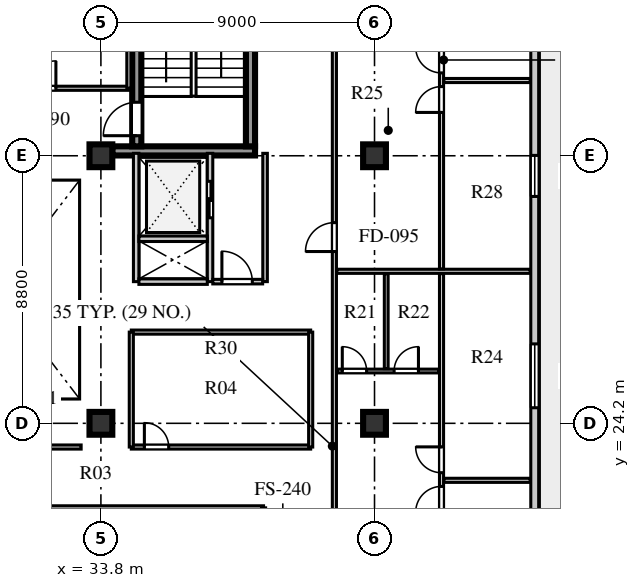
"""IFC4 building model, lengths in metres.
Left out: names, types, materials, properties, quantities, classifications, styles, units other than length and angle.
Written with IfcOpenShell. Run it as: python <this file> out.ifc"""

import sys

from ifc_helpers import new_model, si_unit, direction, frame, frame_2d, origin, origin_2d, place, context, subcontext, project, spatial, rectangle, extrude, element, fill, save


model = new_model("IFC4")
c1 = context("Model", 3, precision=1e-05, world=origin(), true_north=direction((0.0, 1.0)))
c2 = subcontext(c1, "Body", "Model", "MODEL_VIEW")
j1 = project(units=[si_unit("LENGTHUNIT", "METRE"), si_unit("PLANEANGLEUNIT", "RADIAN")], contexts=[c1])
p1 = place(None, origin())
s1 = spatial("IfcSite", under=j1, at=p1, CompositionType="ELEMENT")
p2 = place(p1, origin())
s2 = spatial("IfcBuilding", under=s1, at=p2, CompositionType="ELEMENT")
p3 = place(p2, frame((0.0, 0.0, 296.0)))
s3 = spatial("IfcBuildingStorey", under=s2, at=p3, CompositionType="ELEMENT", Elevation=296.0)
p4 = place(p3, frame((34.175, 33.16, 0.0), z_axis=(0.0, 0.0, 1.0), x_axis=(1.0, 0.0, 0.0)))
e1 = element("IfcWall", 1, at=p4, inside=s3, PredefinedType="SHEAR", context=c2, shape_type="SweptSolid", body=[
    extrude(rectangle(XDim=4.695, YDim=0.3, at=frame_2d((2.348, 0.0))), origin(), (0.0, 0.0, 1.0), 3.66),
])
p5 = place(p3, frame((34.98, 33.31, 0.0), z_axis=(0.0, 0.0, 1.0), x_axis=(0.0, 1.0, 0.0)))
e2 = element("IfcWall", 2, at=p5, inside=s3, PredefinedType="SHEAR", context=c2, shape_type="SweptSolid", body=[
    extrude(rectangle(XDim=8.03, YDim=0.3, at=frame_2d((4.015, 0.0))), origin(), (0.0, 0.0, 1.0), 3.66),
])
p6 = place(p5, frame((0.35, 0.0, 0.0)))
e3 = element("IfcOpeningElement", 3, at=p6, cuts=e2, PredefinedType="OPENING", context=c2, shape_type="SweptSolid", body=[
    extrude(rectangle(XDim=1.1, YDim=2.1, at=frame_2d((0.55, 1.05))), frame((0.0, 0.16, 0.0), z_axis=(0.0, -1.0, 0.0), x_axis=(1.0, 0.0, 0.0)), (0.0, 0.0, 1.0), 0.32),
])
p7 = place(p3, frame((38.72, 33.31, 0.0), z_axis=(0.0, 0.0, 1.0), x_axis=(0.0, 1.0, 0.0)))
e4 = element("IfcWall", 4, at=p7, inside=s3, PredefinedType="SHEAR", context=c2, shape_type="SweptSolid", body=[
    extrude(rectangle(XDim=8.03, YDim=0.3, at=frame_2d((4.015, 0.0))), origin(), (0.0, 0.0, 1.0), 3.66),
])
for number, where, z_axis, x_axis in (
    (5, (33.8, 24.2, 0.0), (0.0, 0.0, 1.0), (1.0, 0.0, 0.0)),
    (6, (33.8, 33.0, 0.0), (0.0, 0.0, 1.0), (1.0, 0.0, 0.0)),
    (7, (42.8, 24.2, 0.0), (0.0, 0.0, 1.0), (1.0, 0.0, 0.0)),
    (8, (42.8, 33.0, 0.0), (0.0, 0.0, 1.0), (1.0, 0.0, 0.0)),
):
    element("IfcColumn", number, at=place(p3, frame(where, z_axis=z_axis, x_axis=x_axis)), inside=s3, PredefinedType="COLUMN", context=c2, shape_type="SweptSolid", body=[
        extrude(rectangle(XDim=0.75, YDim=0.75, at=origin_2d()), origin(), (0.0, 0.0, 1.0), 3.66),
    ])
p8 = place(p3, frame((48.07, 13.41, 0.0), z_axis=(0.0, 0.0, 1.0), x_axis=(0.0, 1.0, 0.0)))
e9 = element("IfcWall", 9, at=p8, inside=s3, PredefinedType="SOLIDWALL", context=c2, shape_type="SweptSolid", body=[
    extrude(rectangle(XDim=30.38, YDim=0.26, at=frame_2d((15.19, 0.0))), origin(), (0.0, 0.0, 1.0), 3.66),
])
p9 = place(p8, frame((2.43, 0.0, 0.0)))
e10 = element("IfcOpeningElement", 10, at=p9, cuts=e9, PredefinedType="OPENING", context=c2, shape_type="SweptSolid", body=[
    extrude(rectangle(XDim=1.0, YDim=2.05, at=frame_2d((0.5, 1.025))), frame((0.0, 0.14, 0.0), z_axis=(0.0, -1.0, 0.0), x_axis=(1.0, 0.0, 0.0)), (0.0, 0.0, 1.0), 0.28),
])
p10 = place(p8, frame((5.002, 0.0, 0.8)))
e11 = element("IfcOpeningElement", 11, at=p10, cuts=e9, PredefinedType="OPENING", context=c2, shape_type="SweptSolid", body=[
    extrude(rectangle(XDim=2.4, YDim=2.05, at=frame_2d((1.2, 1.025))), frame((0.0, 0.14, 0.0), z_axis=(0.0, -1.0, 0.0), x_axis=(1.0, 0.0, 0.0)), (0.0, 0.0, 1.0), 0.28),
])
p11 = place(p8, frame((11.302, 0.0, 0.8)))
e12 = element("IfcOpeningElement", 12, at=p11, cuts=e9, PredefinedType="OPENING", context=c2, shape_type="SweptSolid", body=[
    extrude(rectangle(XDim=2.1, YDim=1.95, at=frame_2d((1.05, 0.975))), frame((0.0, 0.14, 0.0), z_axis=(0.0, -1.0, 0.0), x_axis=(1.0, 0.0, 0.0)), (0.0, 0.0, 1.0), 0.28),
])
p12 = place(p8, frame((18.252, 0.0, 0.8)))
e13 = element("IfcOpeningElement", 13, at=p12, cuts=e9, PredefinedType="OPENING", context=c2, shape_type="SweptSolid", body=[
    extrude(rectangle(XDim=1.35, YDim=1.9, at=frame_2d((0.675, 0.95))), frame((0.0, 0.14, 0.0), z_axis=(0.0, -1.0, 0.0), x_axis=(1.0, 0.0, 0.0)), (0.0, 0.0, 1.0), 0.28),
])
p13 = place(p8, frame((24.427, 0.0, 0.8)))
e14 = element("IfcOpeningElement", 14, at=p13, cuts=e9, PredefinedType="OPENING", context=c2, shape_type="SweptSolid", body=[
    extrude(rectangle(XDim=1.65, YDim=1.95, at=frame_2d((0.825, 0.975))), frame((0.0, 0.14, 0.0), z_axis=(0.0, -1.0, 0.0), x_axis=(1.0, 0.0, 0.0)), (0.0, 0.0, 1.0), 0.28),
])
p14 = place(p3, frame((34.96, 28.86, 0.0), z_axis=(0.0, 0.0, 1.0), x_axis=(0.0, 1.0, 0.0)))
e15 = element("IfcWall", 15, at=p14, inside=s3, PredefinedType="SOLIDWALL", context=c2, shape_type="SweptSolid", body=[
    extrude(rectangle(XDim=4.22, YDim=0.18, at=frame_2d((2.11, 0.0))), origin(), (0.0, 0.0, 1.0), 3.66),
])
p15 = place(p3, frame((37.39, 28.86, 0.0), z_axis=(0.0, 0.0, 1.0), x_axis=(0.0, 1.0, 0.0)))
e16 = element("IfcWall", 16, at=p15, inside=s3, PredefinedType="SOLIDWALL", context=c2, shape_type="SweptSolid", body=[
    extrude(rectangle(XDim=4.22, YDim=0.18, at=frame_2d((2.11, 0.0))), origin(), (0.0, 0.0, 1.0), 3.66),
])
p16 = place(p15, frame((2.1, 0.0, 0.0)))
e17 = element("IfcOpeningElement", 17, at=p16, cuts=e16, PredefinedType="OPENING", context=c2, shape_type="SweptSolid", body=[
    extrude(rectangle(XDim=1.2, YDim=2.12, at=frame_2d((0.6, 1.06))), frame((0.0, 0.1, 0.0), z_axis=(0.0, -1.0, 0.0), x_axis=(1.0, 0.0, 0.0)), (0.0, 0.0, 1.0), 0.2),
])
for number, where, z_axis, x_axis in (
    (18, (35.05, 28.86, 0.0), (0.0, 0.0, 1.0), (1.0, 0.0, 0.0)),
    (19, (35.05, 30.27, 0.0), (0.0, 0.0, 1.0), (1.0, 0.0, 0.0)),
):
    element("IfcWall", number, at=place(p3, frame(where, z_axis=z_axis, x_axis=x_axis)), inside=s3, PredefinedType="SOLIDWALL", context=c2, shape_type="SweptSolid", body=[
        extrude(rectangle(XDim=2.25, YDim=0.18, at=frame_2d((1.125, 0.0))), origin(), (0.0, 0.0, 1.0), 3.66),
    ])
p17 = place(p3, frame((39.2, 28.86, 0.0), z_axis=(0.0, 0.0, 1.0), x_axis=(0.0, 1.0, 0.0)))
e20 = element("IfcWall", 20, at=p17, inside=s3, PredefinedType="PARTITIONING", context=c2, shape_type="SweptSolid", body=[
    extrude(rectangle(XDim=4.22, YDim=0.15, at=frame_2d((2.11, 0.0))), origin(), (0.0, 0.0, 1.0), 3.66),
])
p18 = place(p3, frame((37.48, 28.86, 0.0), z_axis=(0.0, 0.0, 1.0), x_axis=(1.0, 0.0, 0.0)))
e21 = element("IfcWall", 21, at=p18, inside=s3, PredefinedType="PARTITIONING", context=c2, shape_type="SweptSolid", body=[
    extrude(rectangle(XDim=1.64, YDim=0.15, at=frame_2d((0.82, 0.0))), origin(), (0.0, 0.0, 1.0), 3.66),
])
p19 = place(p18, frame((0.3, 0.0, 0.0)))
e22 = element("IfcOpeningElement", 22, at=p19, cuts=e21, PredefinedType="OPENING", context=c2, shape_type="SweptSolid", body=[
    extrude(rectangle(XDim=1.0, YDim=2.1, at=frame_2d((0.5, 1.05))), frame((0.0, 0.085, 0.0), z_axis=(0.0, -1.0, 0.0), x_axis=(1.0, 0.0, 0.0)), (0.0, 0.0, 1.0), 0.17),
])
p20 = place(p3, frame((27.08, 21.42, 0.0), z_axis=(0.0, 0.0, 1.0), x_axis=(1.0, 0.0, 0.0)))
e23 = element("IfcWall", 23, at=p20, inside=s3, PredefinedType="PARTITIONING", context=c2, shape_type="SweptSolid", body=[
    extrude(rectangle(XDim=12.07, YDim=0.135, at=frame_2d((6.035, 0.0))), origin(), (0.0, 0.0, 1.0), 3.36),
])
p21 = place(p20, frame((0.63, 0.0, 0.0)))
e24 = element("IfcOpeningElement", 24, at=p21, cuts=e23, PredefinedType="OPENING", context=c2, shape_type="SweptSolid", body=[
    extrude(rectangle(XDim=0.95, YDim=2.1, at=frame_2d((0.475, 1.05))), frame((0.0, 0.078, 0.0), z_axis=(0.0, -1.0, 0.0), x_axis=(1.0, 0.0, 0.0)), (0.0, 0.0, 1.0), 0.155),
])
p22 = place(p3, frame((27.15, 23.42, 0.0), z_axis=(0.0, 0.0, 1.0), x_axis=(1.0, 0.0, 0.0)))
e25 = element("IfcWall", 25, at=p22, inside=s3, PredefinedType="PARTITIONING", context=c2, shape_type="SweptSolid", body=[
    extrude(rectangle(XDim=6.0, YDim=0.135, at=frame_2d((3.0, 0.0))), origin(), (0.0, 0.0, 1.0), 3.66),
])
p23 = place(p3, frame((25.22, 35.22, 0.0), z_axis=(0.0, 0.0, 1.0), x_axis=(1.0, 0.0, 0.0)))
e26 = element("IfcWall", 26, at=p23, inside=s3, PredefinedType="PARTITIONING", context=c2, shape_type="SweptSolid", body=[
    extrude(rectangle(XDim=9.5, YDim=0.135, at=frame_2d((4.75, 0.0))), origin(), (0.0, 0.0, 1.0), 3.66),
])
p24 = place(p23, frame((1.2, 0.0, 0.0)))
e27 = element("IfcOpeningElement", 27, at=p24, cuts=e26, PredefinedType="OPENING", context=c2, shape_type="SweptSolid", body=[
    extrude(rectangle(XDim=1.0, YDim=2.08, at=frame_2d((0.5, 1.04))), frame((0.0, 0.078, 0.0), z_axis=(0.0, -1.0, 0.0), x_axis=(1.0, 0.0, 0.0)), (0.0, 0.0, 1.0), 0.155),
])
p25 = place(p23, frame((6.2, 0.0, 0.0)))
e28 = element("IfcOpeningElement", 28, at=p25, cuts=e26, PredefinedType="OPENING", context=c2, shape_type="SweptSolid", body=[
    extrude(rectangle(XDim=0.9, YDim=2.08, at=frame_2d((0.45, 1.04))), frame((0.0, 0.078, 0.0), z_axis=(0.0, -1.0, 0.0), x_axis=(1.0, 0.0, 0.0)), (0.0, 0.0, 1.0), 0.155),
])
p26 = place(p3, frame((39.15, 10.38, 0.0), z_axis=(0.0, 0.0, 1.0), x_axis=(0.0, 1.0, 0.0)))
e29 = element("IfcWall", 29, at=p26, inside=s3, PredefinedType="PARTITIONING", context=c2, shape_type="SweptSolid", body=[
    extrude(rectangle(XDim=11.04, YDim=0.135, at=frame_2d((5.52, 0.0))), origin(), (0.0, 0.0, 1.0), 3.66),
])
p27 = place(p3, frame((34.72, 35.22, 0.0), z_axis=(0.0, 0.0, 1.0), x_axis=(0.0, 1.0, 0.0)))
e30 = element("IfcWall", 30, at=p27, inside=s3, PredefinedType="PARTITIONING", context=c2, shape_type="SweptSolid", body=[
    extrude(rectangle(XDim=11.6, YDim=0.135, at=frame_2d((5.8, 0.0))), origin(), (0.0, 0.0, 1.0), 3.66),
])
p28 = place(p3, frame((41.48, 15.35, 0.0), z_axis=(0.0, 0.0, 1.0), x_axis=(0.0, 1.0, 0.0)))
e31 = element("IfcWall", 31, at=p28, inside=s3, PredefinedType="PARTITIONING", context=c2, shape_type="SweptSolid", body=[
    extrude(rectangle(XDim=26.5, YDim=0.135, at=frame_2d((13.25, 0.0))), origin(), (0.0, 0.0, 1.0), 3.66),
])
p29 = place(p28, frame((0.75, 0.0, 0.0)))
e32 = element("IfcOpeningElement", 32, at=p29, cuts=e31, PredefinedType="OPENING", context=c2, shape_type="SweptSolid", body=[
    extrude(rectangle(XDim=0.95, YDim=2.1, at=frame_2d((0.475, 1.05))), frame((0.0, 0.078, 0.0), z_axis=(0.0, -1.0, 0.0), x_axis=(1.0, 0.0, 0.0)), (0.0, 0.0, 1.0), 0.155),
])
p30 = place(p28, frame((14.5, 0.0, 0.0)))
e33 = element("IfcOpeningElement", 33, at=p30, cuts=e31, PredefinedType="OPENING", context=c2, shape_type="SweptSolid", body=[
    extrude(rectangle(XDim=0.95, YDim=2.1, at=frame_2d((0.475, 1.05))), frame((0.0, 0.078, 0.0), z_axis=(0.0, -1.0, 0.0), x_axis=(1.0, 0.0, 0.0)), (0.0, 0.0, 1.0), 0.155),
])
p31 = place(p3, frame((45.004, 15.53, 0.0), z_axis=(0.0, 0.0, 1.0), x_axis=(0.0, 1.0, 0.0)))
e34 = element("IfcWall", 34, at=p31, inside=s3, PredefinedType="PARTITIONING", context=c2, shape_type="SweptSolid", body=[
    extrude(rectangle(XDim=13.59, YDim=0.135, at=frame_2d((6.795, 0.0))), origin(), (0.0, 0.0, 1.0), 3.66),
])
p32 = place(p31, frame((5.745, 0.0, 0.0)))
e35 = element("IfcOpeningElement", 35, at=p32, cuts=e34, PredefinedType="OPENING", context=c2, shape_type="SweptSolid", body=[
    extrude(rectangle(XDim=0.85, YDim=2.08, at=frame_2d((0.425, 1.04))), frame((0.0, 0.078, 0.0), z_axis=(0.0, -1.0, 0.0), x_axis=(1.0, 0.0, 0.0)), (0.0, 0.0, 1.0), 0.155),
])
p33 = place(p31, frame((7.045, 0.0, 0.0)))
e36 = element("IfcOpeningElement", 36, at=p33, cuts=e34, PredefinedType="OPENING", context=c2, shape_type="SweptSolid", body=[
    extrude(rectangle(XDim=0.85, YDim=2.08, at=frame_2d((0.425, 1.04))), frame((0.0, 0.078, 0.0), z_axis=(0.0, -1.0, 0.0), x_axis=(1.0, 0.0, 0.0)), (0.0, 0.0, 1.0), 0.155),
])
p34 = place(p3, frame((41.58, 25.92, 0.0), z_axis=(0.0, 0.0, 1.0), x_axis=(1.0, 0.0, 0.0)))
e37 = element("IfcWall", 37, at=p34, inside=s3, PredefinedType="PLUMBINGWALL", context=c2, shape_type="SweptSolid", body=[
    extrude(rectangle(XDim=3.344, YDim=0.125, at=frame_2d((1.672, 0.0))), origin(), (0.0, 0.0, 1.0), 3.66),
])
p35 = place(p34, frame((0.16, 0.0, 0.0)))
e38 = element("IfcOpeningElement", 38, at=p35, cuts=e37, PredefinedType="OPENING", context=c2, shape_type="SweptSolid", body=[
    extrude(rectangle(XDim=0.8, YDim=2.05, at=frame_2d((0.4, 1.025))), frame((0.0, 0.073, 0.0), z_axis=(0.0, -1.0, 0.0), x_axis=(1.0, 0.0, 0.0)), (0.0, 0.0, 1.0), 0.145),
])
p36 = place(p34, frame((1.865, 0.0, 0.0)))
e39 = element("IfcOpeningElement", 39, at=p36, cuts=e37, PredefinedType="OPENING", context=c2, shape_type="SweptSolid", body=[
    extrude(rectangle(XDim=0.8, YDim=2.05, at=frame_2d((0.4, 1.025))), frame((0.0, 0.073, 0.0), z_axis=(0.0, -1.0, 0.0), x_axis=(1.0, 0.0, 0.0)), (0.0, 0.0, 1.0), 0.145),
])
p37 = place(p3, frame((43.185, 26.0, 0.0), z_axis=(0.0, 0.0, 1.0), x_axis=(0.0, 1.0, 0.0)))
e40 = element("IfcWall", 40, at=p37, inside=s3, PredefinedType="PLUMBINGWALL", context=c2, shape_type="SweptSolid", body=[
    extrude(rectangle(XDim=3.12, YDim=0.125, at=frame_2d((1.56, 0.0))), origin(), (0.0, 0.0, 1.0), 3.66),
])
p38 = place(p3, frame((45.084, 22.325, 0.0), z_axis=(0.0, 0.0, 1.0), x_axis=(1.0, 0.0, 0.0)))
e41 = element("IfcWall", 41, at=p38, inside=s3, PredefinedType="PARTITIONING", context=c2, shape_type="SweptSolid", body=[
    extrude(rectangle(XDim=2.836, YDim=0.135, at=frame_2d((1.418, 0.0))), origin(), (0.0, 0.0, 1.0), 3.66),
])
p39 = place(p3, frame((41.56, 29.2, 0.0), z_axis=(0.0, 0.0, 1.0), x_axis=(1.0, 0.0, 0.0)))
e42 = element("IfcWall", 42, at=p39, inside=s3, PredefinedType="PARTITIONING", context=c2, shape_type="SweptSolid", body=[
    extrude(rectangle(XDim=6.36, YDim=0.135, at=frame_2d((3.18, 0.0))), origin(), (0.0, 0.0, 1.0), 3.66),
])
p40 = place(p3, frame((45.004, 29.28, 0.0), z_axis=(0.0, 0.0, 1.0), x_axis=(0.0, 1.0, 0.0)))
e43 = element("IfcWall", 43, at=p40, inside=s3, PredefinedType="PARTITIONING", context=c2, shape_type="SweptSolid", body=[
    extrude(rectangle(XDim=12.39, YDim=0.135, at=frame_2d((6.195, 0.0))), origin(), (0.0, 0.0, 1.0), 3.66),
])
p41 = place(p40, frame((5.145, 0.0, 0.0)))
e44 = element("IfcOpeningElement", 44, at=p41, cuts=e43, PredefinedType="OPENING", context=c2, shape_type="SweptSolid", body=[
    extrude(rectangle(XDim=0.85, YDim=2.08, at=frame_2d((0.425, 1.04))), frame((0.0, 0.078, 0.0), z_axis=(0.0, -1.0, 0.0), x_axis=(1.0, 0.0, 0.0)), (0.0, 0.0, 1.0), 0.155),
])
p42 = place(p40, frame((6.445, 0.0, 0.0)))
e45 = element("IfcOpeningElement", 45, at=p42, cuts=e43, PredefinedType="OPENING", context=c2, shape_type="SweptSolid", body=[
    extrude(rectangle(XDim=0.85, YDim=2.08, at=frame_2d((0.425, 1.04))), frame((0.0, 0.078, 0.0), z_axis=(0.0, -1.0, 0.0), x_axis=(1.0, 0.0, 0.0)), (0.0, 0.0, 1.0), 0.155),
])
p43 = place(p3, frame((45.084, 35.475, 0.0), z_axis=(0.0, 0.0, 1.0), x_axis=(1.0, 0.0, 0.0)))
e46 = element("IfcWall", 46, at=p43, inside=s3, PredefinedType="PARTITIONING", context=c2, shape_type="SweptSolid", body=[
    extrude(rectangle(XDim=2.836, YDim=0.135, at=frame_2d((1.418, 0.0))), origin(), (0.0, 0.0, 1.0), 3.66),
])
p44 = place(p3, frame((34.8, 23.42, 0.0), z_axis=(0.0, 0.0, 1.0), x_axis=(1.0, 0.0, 0.0)))
e47 = element("IfcWall", 47, at=p44, inside=s3, PredefinedType="PARTITIONING", context=c2, shape_type="SweptSolid", body=[
    extrude(rectangle(XDim=5.9, YDim=0.135, at=frame_2d((2.95, 0.0))), origin(), (0.0, 0.0, 1.0), 3.66),
])
p45 = place(p44, frame((0.43, 0.0, 0.0)))
e48 = element("IfcOpeningElement", 48, at=p45, cuts=e47, PredefinedType="OPENING", context=c2, shape_type="SweptSolid", body=[
    extrude(rectangle(XDim=0.8, YDim=2.05, at=frame_2d((0.4, 1.025))), frame((0.0, 0.078, 0.0), z_axis=(0.0, -1.0, 0.0), x_axis=(1.0, 0.0, 0.0)), (0.0, 0.0, 1.0), 0.155),
])
p46 = place(p3, frame((34.8, 27.2, 0.0), z_axis=(0.0, 0.0, 1.0), x_axis=(1.0, 0.0, 0.0)))
e49 = element("IfcWall", 49, at=p46, inside=s3, PredefinedType="PARTITIONING", context=c2, shape_type="SweptSolid", body=[
    extrude(rectangle(XDim=5.9, YDim=0.135, at=frame_2d((2.95, 0.0))), origin(), (0.0, 0.0, 1.0), 3.36),
])
for number, where, z_axis, x_axis in (
    (50, (34.8, 23.42, 0.0), (0.0, 0.0, 1.0), (0.0, 1.0, 0.0)),
    (51, (40.7, 23.42, 0.0), (0.0, 0.0, 1.0), (0.0, 1.0, 0.0)),
):
    element("IfcWall", number, at=place(p3, frame(where, z_axis=z_axis, x_axis=x_axis)), inside=s3, PredefinedType="PARTITIONING", context=c2, shape_type="SweptSolid", body=[
        extrude(rectangle(XDim=3.78, YDim=0.135, at=frame_2d((1.89, 0.0))), origin(), (0.0, 0.0, 1.0), 3.66),
    ])
p47 = place(p11, origin())
e52 = element("IfcWindow", 52, at=p47, inside=s3, PartitioningType="SINGLE_PANEL", PredefinedType="WINDOW", context=c2, shape_type="SweptSolid", body=[
    extrude(rectangle(XDim=2.1, YDim=1.95, at=frame_2d((1.05, 0.975))), frame((0.0, 0.03, 0.0), z_axis=(0.0, -1.0, 0.0), x_axis=(1.0, 0.0, 0.0)), (0.0, 0.0, 1.0), 0.06),
])
fill(e12, e52)
p48 = place(p12, origin())
e53 = element("IfcWindow", 53, at=p48, inside=s3, PartitioningType="SINGLE_PANEL", PredefinedType="WINDOW", context=c2, shape_type="SweptSolid", body=[
    extrude(rectangle(XDim=1.35, YDim=1.9, at=frame_2d((0.675, 0.95))), frame((0.0, 0.03, 0.0), z_axis=(0.0, -1.0, 0.0), x_axis=(1.0, 0.0, 0.0)), (0.0, 0.0, 1.0), 0.06),
])
fill(e13, e53)
p49 = place(p6, origin())
e54 = element("IfcDoor", 54, at=p49, inside=s3, OperationType="SINGLE_SWING_LEFT", PredefinedType="DOOR", context=c2, shape_type="SweptSolid", body=[
    extrude(rectangle(XDim=1.1, YDim=2.1, at=frame_2d((0.55, 1.05))), frame((0.0, 0.025, 0.0), z_axis=(0.0, -1.0, 0.0), x_axis=(1.0, 0.0, 0.0)), (0.0, 0.0, 1.0), 0.05),
])
fill(e3, e54)
p50 = place(p16, frame((1.2, 0.0, 0.0), z_axis=(0.0, 0.0, 1.0), x_axis=(-1.0, 0.0, 0.0)))
e55 = element("IfcDoor", 55, at=p50, inside=s3, OperationType="DOUBLE_DOOR_SLIDING", PredefinedType="DOOR", context=c2, shape_type="SweptSolid", body=[
    extrude(rectangle(XDim=1.2, YDim=2.12, at=frame_2d((0.6, 1.06))), frame((0.0, 0.025, 0.0), z_axis=(0.0, -1.0, 0.0), x_axis=(1.0, 0.0, 0.0)), (0.0, 0.0, 1.0), 0.05),
])
fill(e17, e55)
p51 = place(p19, origin())
e56 = element("IfcDoor", 56, at=p51, inside=s3, OperationType="SINGLE_SWING_LEFT", PredefinedType="DOOR", context=c2, shape_type="SweptSolid", body=[
    extrude(rectangle(XDim=1.0, YDim=2.1, at=frame_2d((0.5, 1.05))), frame((0.0, 0.025, 0.0), z_axis=(0.0, -1.0, 0.0), x_axis=(1.0, 0.0, 0.0)), (0.0, 0.0, 1.0), 0.05),
])
fill(e22, e56)
p52 = place(p25, origin())
e57 = element("IfcDoor", 57, at=p52, inside=s3, OperationType="SINGLE_SWING_RIGHT", PredefinedType="DOOR", context=c2, shape_type="SweptSolid", body=[
    extrude(rectangle(XDim=0.9, YDim=2.08, at=frame_2d((0.45, 1.04))), frame((0.0, 0.025, 0.0), z_axis=(0.0, -1.0, 0.0), x_axis=(1.0, 0.0, 0.0)), (0.0, 0.0, 1.0), 0.05),
])
fill(e28, e57)
p53 = place(p35, origin())
e58 = element("IfcDoor", 58, at=p53, inside=s3, OperationType="SINGLE_SWING_LEFT", PredefinedType="DOOR", context=c2, shape_type="SweptSolid", body=[
    extrude(rectangle(XDim=0.8, YDim=2.05, at=frame_2d((0.4, 1.025))), frame((0.0, 0.025, 0.0), z_axis=(0.0, -1.0, 0.0), x_axis=(1.0, 0.0, 0.0)), (0.0, 0.0, 1.0), 0.05),
])
fill(e38, e58)
p54 = place(p36, origin())
e59 = element("IfcDoor", 59, at=p54, inside=s3, OperationType="SINGLE_SWING_RIGHT", PredefinedType="DOOR", context=c2, shape_type="SweptSolid", body=[
    extrude(rectangle(XDim=0.8, YDim=2.05, at=frame_2d((0.4, 1.025))), frame((0.0, 0.025, 0.0), z_axis=(0.0, -1.0, 0.0), x_axis=(1.0, 0.0, 0.0)), (0.0, 0.0, 1.0), 0.05),
])
fill(e39, e59)
p55 = place(p32, origin())
e60 = element("IfcDoor", 60, at=p55, inside=s3, OperationType="SINGLE_SWING_LEFT", PredefinedType="DOOR", context=c2, shape_type="SweptSolid", body=[
    extrude(rectangle(XDim=0.85, YDim=2.08, at=frame_2d((0.425, 1.04))), frame((0.0, 0.025, 0.0), z_axis=(0.0, -1.0, 0.0), x_axis=(1.0, 0.0, 0.0)), (0.0, 0.0, 1.0), 0.05),
])
fill(e35, e60)
p56 = place(p33, origin())
e61 = element("IfcDoor", 61, at=p56, inside=s3, OperationType="SINGLE_SWING_RIGHT", PredefinedType="DOOR", context=c2, shape_type="SweptSolid", body=[
    extrude(rectangle(XDim=0.85, YDim=2.08, at=frame_2d((0.425, 1.04))), frame((0.0, 0.025, 0.0), z_axis=(0.0, -1.0, 0.0), x_axis=(1.0, 0.0, 0.0)), (0.0, 0.0, 1.0), 0.05),
])
fill(e36, e61)
p57 = place(p41, origin())
e62 = element("IfcDoor", 62, at=p57, inside=s3, OperationType="SINGLE_SWING_LEFT", PredefinedType="DOOR", context=c2, shape_type="SweptSolid", body=[
    extrude(rectangle(XDim=0.85, YDim=2.08, at=frame_2d((0.425, 1.04))), frame((0.0, 0.025, 0.0), z_axis=(0.0, -1.0, 0.0), x_axis=(1.0, 0.0, 0.0)), (0.0, 0.0, 1.0), 0.05),
])
fill(e44, e62)
p58 = place(p42, origin())
e63 = element("IfcDoor", 63, at=p58, inside=s3, OperationType="SINGLE_SWING_RIGHT", PredefinedType="DOOR", context=c2, shape_type="SweptSolid", body=[
    extrude(rectangle(XDim=0.85, YDim=2.08, at=frame_2d((0.425, 1.04))), frame((0.0, 0.025, 0.0), z_axis=(0.0, -1.0, 0.0), x_axis=(1.0, 0.0, 0.0)), (0.0, 0.0, 1.0), 0.05),
])
fill(e45, e63)
p59 = place(p30, origin())
e64 = element("IfcDoor", 64, at=p59, inside=s3, OperationType="SINGLE_SWING_LEFT", PredefinedType="DOOR", context=c2, shape_type="SweptSolid", body=[
    extrude(rectangle(XDim=0.95, YDim=2.1, at=frame_2d((0.475, 1.05))), frame((0.0, 0.025, 0.0), z_axis=(0.0, -1.0, 0.0), x_axis=(1.0, 0.0, 0.0)), (0.0, 0.0, 1.0), 0.05),
])
fill(e33, e64)
p60 = place(p45, origin())
e65 = element("IfcDoor", 65, at=p60, inside=s3, OperationType="SINGLE_SWING_LEFT", PredefinedType="DOOR", context=c2, shape_type="SweptSolid", body=[
    extrude(rectangle(XDim=0.8, YDim=2.05, at=frame_2d((0.4, 1.025))), frame((0.0, 0.025, 0.0), z_axis=(0.0, -1.0, 0.0), x_axis=(1.0, 0.0, 0.0)), (0.0, 0.0, 1.0), 0.05),
])
fill(e48, e65)
save(model, sys.argv[1])
